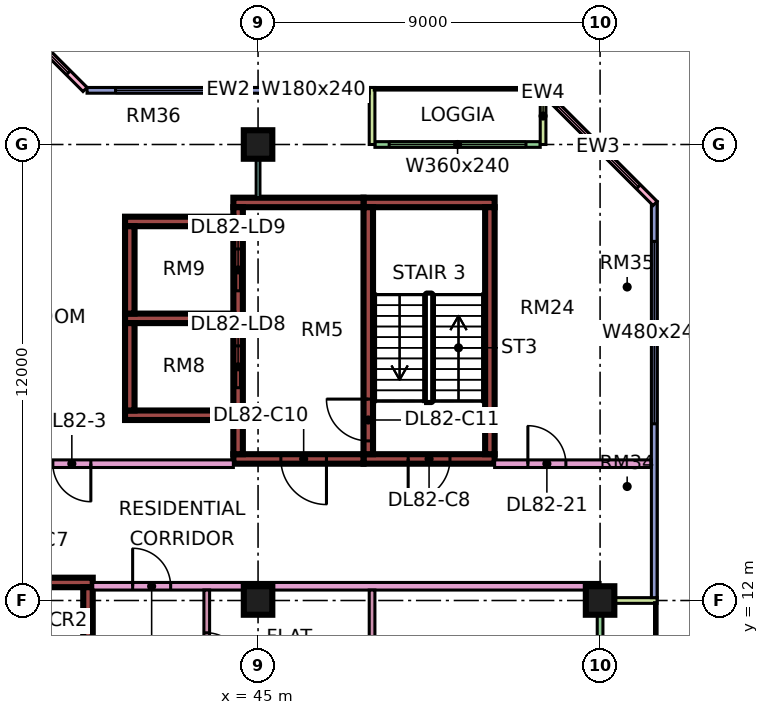
"""IFC4 building model, lengths in metres.
Left out: names, types, materials, properties, quantities, classifications, styles, units other than length and angle.
Written with IfcOpenShell. Run it as: python <this file> out.ifc"""

import sys

from ifc_helpers import new_model, si_unit, direction, frame, frame_2d, origin, origin_2d, place, context, subcontext, project, spatial, rectangle, extrude, element, fill, save


model = new_model("IFC4")
c1 = context("Model", 3, precision=1e-05, world=origin(), true_north=direction((0.0, 1.0)))
c2 = subcontext(c1, "Body", "Model", "MODEL_VIEW")
j1 = project(units=[si_unit("LENGTHUNIT", "METRE"), si_unit("PLANEANGLEUNIT", "RADIAN")], contexts=[c1])
p1 = place(None, origin())
s1 = spatial("IfcSite", under=j1, at=p1, CompositionType="ELEMENT")
p2 = place(p1, origin())
s2 = spatial("IfcBuilding", under=s1, at=p2, CompositionType="ELEMENT")
p3 = place(p2, frame((0.0, 0.0, 353.9)))
s3 = spatial("IfcBuildingStorey", under=s2, at=p3, CompositionType="ELEMENT", Elevation=353.9)
for number, where, z_axis, x_axis in (
    (1, (45.0, 12.0, 0.0), (0.0, 0.0, 1.0), (1.0, 0.0, 0.0)),
    (2, (45.0, 24.0, 0.0), (0.0, 0.0, 1.0), (1.0, 0.0, 0.0)),
    (3, (54.0, 12.0, 0.0), (0.0, 0.0, 1.0), (1.0, 0.0, 0.0)),
):
    element("IfcColumn", number, at=place(p3, frame(where, z_axis=z_axis, x_axis=x_axis)), inside=s3, PredefinedType="COLUMN", context=c2, shape_type="SweptSolid", body=[
        extrude(rectangle(XDim=0.75, YDim=0.75, at=origin_2d()), origin(), (0.0, 0.0, 1.0), 3.75),
    ])
p4 = place(p3, frame((36.375, 12.475, 0.0), z_axis=(0.0, 0.0, 1.0), x_axis=(1.0, 0.0, 0.0)))
e4 = element("IfcWall", 4, at=p4, inside=s3, PredefinedType="SHEAR", context=c2, shape_type="SweptSolid", body=[
    extrude(rectangle(XDim=4.275, YDim=0.25, at=frame_2d((2.137, 0.0))), origin(), (0.0, 0.0, 1.0), 3.75),
])
p5 = place(p4, frame((2.0, 0.0, 0.0)))
e5 = element("IfcOpeningElement", 5, at=p5, cuts=e4, PredefinedType="OPENING", context=c2, shape_type="SweptSolid", body=[
    extrude(rectangle(XDim=1.1, YDim=2.2, at=frame_2d((0.55, 1.1))), frame((0.0, 0.135, 0.0), z_axis=(0.0, -1.0, 0.0), x_axis=(1.0, 0.0, 0.0)), (0.0, 0.0, 1.0), 0.27),
])
p6 = place(p3, frame((40.525, 5.85, 0.0), z_axis=(0.0, 0.0, 1.0), x_axis=(0.0, 1.0, 0.0)))
e6 = element("IfcWall", 6, at=p6, inside=s3, PredefinedType="SHEAR", context=c2, shape_type="SweptSolid", body=[
    extrude(rectangle(XDim=6.5, YDim=0.25, at=frame_2d((3.25, 0.0))), origin(), (0.0, 0.0, 1.0), 3.75),
])
p7 = place(p3, frame((47.775, 15.725, 0.0), z_axis=(0.0, 0.0, 1.0), x_axis=(1.0, 0.0, 0.0)))
e7 = element("IfcWall", 7, at=p7, inside=s3, PredefinedType="SHEAR", context=c2, shape_type="SweptSolid", body=[
    extrude(rectangle(XDim=3.45, YDim=0.25, at=frame_2d((1.725, 0.0))), origin(), (0.0, 0.0, 1.0), 3.75),
])
p8 = place(p7, frame((1.175, 0.0, 0.0)))
e8 = element("IfcOpeningElement", 8, at=p8, cuts=e7, PredefinedType="OPENING", context=c2, shape_type="SweptSolid", body=[
    extrude(rectangle(XDim=1.1, YDim=2.2, at=frame_2d((0.55, 1.1))), frame((0.0, 0.135, 0.0), z_axis=(0.0, -1.0, 0.0), x_axis=(1.0, 0.0, 0.0)), (0.0, 0.0, 1.0), 0.27),
])
p9 = place(p3, frame((47.775, 22.475, 0.0), z_axis=(0.0, 0.0, 1.0), x_axis=(1.0, 0.0, 0.0)))
e9 = element("IfcWall", 9, at=p9, inside=s3, PredefinedType="SHEAR", context=c2, shape_type="SweptSolid", body=[
    extrude(rectangle(XDim=3.45, YDim=0.25, at=frame_2d((1.725, 0.0))), origin(), (0.0, 0.0, 1.0), 3.75),
])
p10 = place(p3, frame((47.9, 15.85, 0.0), z_axis=(0.0, 0.0, 1.0), x_axis=(0.0, 1.0, 0.0)))
e10 = element("IfcWall", 10, at=p10, inside=s3, PredefinedType="SHEAR", context=c2, shape_type="SweptSolid", body=[
    extrude(rectangle(XDim=6.5, YDim=0.25, at=frame_2d((3.25, 0.0))), origin(), (0.0, 0.0, 1.0), 3.75),
])
p11 = place(p10, frame((0.35, 0.0, 0.0)))
e11 = element("IfcOpeningElement", 11, at=p11, cuts=e10, PredefinedType="OPENING", context=c2, shape_type="SweptSolid", body=[
    extrude(rectangle(XDim=1.1, YDim=2.2, at=frame_2d((0.55, 1.1))), frame((0.0, 0.135, 0.0), z_axis=(0.0, -1.0, 0.0), x_axis=(1.0, 0.0, 0.0)), (0.0, 0.0, 1.0), 0.27),
])
p12 = place(p3, frame((51.1, 15.85, 0.0), z_axis=(0.0, 0.0, 1.0), x_axis=(0.0, 1.0, 0.0)))
e12 = element("IfcWall", 12, at=p12, inside=s3, PredefinedType="SHEAR", context=c2, shape_type="SweptSolid", body=[
    extrude(rectangle(XDim=6.5, YDim=0.25, at=frame_2d((3.25, 0.0))), origin(), (0.0, 0.0, 1.0), 3.75),
])
p13 = place(p3, frame((44.35, 15.725, 0.0), z_axis=(0.0, 0.0, 1.0), x_axis=(1.0, 0.0, 0.0)))
e13 = element("IfcWall", 13, at=p13, inside=s3, PredefinedType="SHEAR", context=c2, shape_type="SweptSolid", body=[
    extrude(rectangle(XDim=3.425, YDim=0.25, at=frame_2d((1.712, 0.0))), origin(), (0.0, 0.0, 1.0), 3.75),
])
p14 = place(p13, frame((1.25, 0.0, 0.0)))
e14 = element("IfcOpeningElement", 14, at=p14, cuts=e13, PredefinedType="OPENING", context=c2, shape_type="SweptSolid", body=[
    extrude(rectangle(XDim=1.2, YDim=2.2, at=frame_2d((0.6, 1.1))), frame((0.0, 0.135, 0.0), z_axis=(0.0, -1.0, 0.0), x_axis=(1.0, 0.0, 0.0)), (0.0, 0.0, 1.0), 0.27),
])
p15 = place(p3, frame((44.35, 22.475, 0.0), z_axis=(0.0, 0.0, 1.0), x_axis=(1.0, 0.0, 0.0)))
e15 = element("IfcWall", 15, at=p15, inside=s3, PredefinedType="SHEAR", context=c2, shape_type="SweptSolid", body=[
    extrude(rectangle(XDim=3.425, YDim=0.25, at=frame_2d((1.712, 0.0))), origin(), (0.0, 0.0, 1.0), 3.75),
])
p16 = place(p3, frame((44.475, 15.85, 0.0), z_axis=(0.0, 0.0, 1.0), x_axis=(0.0, 1.0, 0.0)))
e16 = element("IfcWall", 16, at=p16, inside=s3, PredefinedType="SHEAR", context=c2, shape_type="SweptSolid", body=[
    extrude(rectangle(XDim=6.5, YDim=0.25, at=frame_2d((3.25, 0.0))), origin(), (0.0, 0.0, 1.0), 3.75),
])
p17 = place(p16, frame((1.75, 0.0, 0.0)))
e17 = element("IfcOpeningElement", 17, at=p17, cuts=e16, PredefinedType="OPENING", context=c2, shape_type="SweptSolid", body=[
    extrude(rectangle(XDim=1.1, YDim=2.2, at=frame_2d((0.55, 1.1))), frame((0.0, 0.135, 0.0), z_axis=(0.0, -1.0, 0.0), x_axis=(1.0, 0.0, 0.0)), (0.0, 0.0, 1.0), 0.27),
])
p18 = place(p16, frame((4.3, 0.0, 0.0)))
e18 = element("IfcOpeningElement", 18, at=p18, cuts=e16, PredefinedType="OPENING", context=c2, shape_type="SweptSolid", body=[
    extrude(rectangle(XDim=1.1, YDim=2.2, at=frame_2d((0.55, 1.1))), frame((0.0, 0.135, 0.0), z_axis=(0.0, -1.0, 0.0), x_axis=(1.0, 0.0, 0.0)), (0.0, 0.0, 1.0), 0.27),
])
for number, where, z_axis, x_axis in (
    (19, (41.5, 16.875, 0.0), (0.0, 0.0, 1.0), (1.0, 0.0, 0.0)),
    (20, (41.5, 19.425, 0.0), (0.0, 0.0, 1.0), (1.0, 0.0, 0.0)),
    (21, (41.5, 21.975, 0.0), (0.0, 0.0, 1.0), (1.0, 0.0, 0.0)),
):
    element("IfcWall", number, at=place(p3, frame(where, z_axis=z_axis, x_axis=x_axis)), inside=s3, PredefinedType="SHEAR", context=c2, shape_type="SweptSolid", body=[
        extrude(rectangle(XDim=2.85, YDim=0.25, at=frame_2d((1.425, 0.0))), origin(), (0.0, 0.0, 1.0), 3.75),
    ])
for number, where, z_axis, x_axis in (
    (22, (41.625, 17.0, 0.0), (0.0, 0.0, 1.0), (0.0, 1.0, 0.0)),
    (23, (41.625, 19.55, 0.0), (0.0, 0.0, 1.0), (0.0, 1.0, 0.0)),
):
    element("IfcWall", number, at=place(p3, frame(where, z_axis=z_axis, x_axis=x_axis)), inside=s3, PredefinedType="SHEAR", context=c2, shape_type="SweptSolid", body=[
        extrude(rectangle(XDim=2.3, YDim=0.25, at=frame_2d((1.15, 0.0))), origin(), (0.0, 0.0, 1.0), 3.75),
    ])
p19 = place(p3, frame((52.425, 24.0, 0.0), z_axis=(0.0, 0.0, 1.0), x_axis=(-1.0, 0.0, 0.0)))
e24 = element("IfcWall", 24, at=p19, inside=s3, PredefinedType="SOLIDWALL", context=c2, shape_type="SweptSolid", body=[
    extrude(rectangle(XDim=4.35, YDim=0.15, at=frame_2d((2.175, 0.0))), origin(), (0.0, 0.0, 1.0), 3.35),
])
p20 = place(p19, frame((0.375, 0.0, 0.45)))
e25 = element("IfcOpeningElement", 25, at=p20, cuts=e24, PredefinedType="OPENING", context=c2, shape_type="SweptSolid", body=[
    extrude(rectangle(XDim=3.6, YDim=2.4, at=frame_2d((1.8, 1.2))), frame((0.0, 0.085, 0.0), z_axis=(0.0, -1.0, 0.0), x_axis=(1.0, 0.0, 0.0)), (0.0, 0.0, 1.0), 0.17),
])
for number, where, z_axis, x_axis in (
    (26, (52.5, 25.5, 0.0), (0.0, 0.0, 1.0), (0.0, -1.0, 0.0)),
    (27, (48.0, 25.5, 0.0), (0.0, 0.0, 1.0), (0.0, -1.0, 0.0)),
):
    element("IfcWall", number, at=place(p3, frame(where, z_axis=z_axis, x_axis=x_axis)), inside=s3, PredefinedType="SOLIDWALL", context=c2, shape_type="SweptSolid", body=[
        extrude(rectangle(XDim=1.5, YDim=0.15, at=frame_2d((0.75, 0.0))), origin(), (0.0, 0.0, 1.0), 3.35),
    ])
p21 = place(p3, frame((47.925, 25.425, 0.0), z_axis=(0.0, 0.0, 1.0), x_axis=(-1.0, 0.0, 0.0)))
e28 = element("IfcWall", 28, at=p21, inside=s3, PredefinedType="SOLIDWALL", context=c2, shape_type="SweptSolid", body=[
    extrude(rectangle(XDim=7.425, YDim=0.15, at=frame_2d((3.712, 0.0))), origin(), (0.0, 0.0, 1.0), 3.35),
])
p22 = place(p21, frame((0.562, 0.0, 0.45)))
e29 = element("IfcOpeningElement", 29, at=p22, cuts=e28, PredefinedType="OPENING", context=c2, shape_type="SweptSolid", body=[
    extrude(rectangle(XDim=1.8, YDim=2.4, at=frame_2d((0.9, 1.2))), frame((0.0, 0.085, 0.0), z_axis=(0.0, -1.0, 0.0), x_axis=(1.0, 0.0, 0.0)), (0.0, 0.0, 1.0), 0.17),
])
p23 = place(p21, frame((3.675, 0.0, 0.45)))
e30 = element("IfcOpeningElement", 30, at=p23, cuts=e28, PredefinedType="OPENING", context=c2, shape_type="SweptSolid", body=[
    extrude(rectangle(XDim=3.0, YDim=2.4, at=frame_2d((1.5, 1.2))), frame((0.0, 0.085, 0.0), z_axis=(0.0, -1.0, 0.0), x_axis=(1.0, 0.0, 0.0)), (0.0, 0.0, 1.0), 0.17),
])
p24 = place(p3, frame((40.447, 25.447, 0.0), z_axis=(0.0, 0.0, 1.0), x_axis=(-0.707106781187, 0.707106781187, 0.0)))
e31 = element("IfcWall", 31, at=p24, inside=s3, PredefinedType="SOLIDWALL", context=c2, shape_type="SweptSolid", body=[
    extrude(rectangle(XDim=4.243, YDim=0.15, at=frame_2d((2.121, 0.0))), origin(), (0.0, 0.0, 1.0), 3.35),
])
p25 = place(p24, frame((0.621, 0.0, 0.45)))
e32 = element("IfcOpeningElement", 32, at=p25, cuts=e31, PredefinedType="OPENING", context=c2, shape_type="SweptSolid", body=[
    extrude(rectangle(XDim=3.0, YDim=2.4, at=frame_2d((1.5, 1.2))), frame((0.0, 0.085, 0.0), z_axis=(0.0, -1.0, 0.0), x_axis=(1.0, 0.0, 0.0)), (0.0, 0.0, 1.0), 0.17),
])
p26 = place(p3, frame((54.0, 1.575, 0.0), z_axis=(0.0, 0.0, 1.0), x_axis=(0.0, 1.0, 0.0)))
e33 = element("IfcWall", 33, at=p26, inside=s3, PredefinedType="SOLIDWALL", context=c2, shape_type="SweptSolid", body=[
    extrude(rectangle(XDim=10.35, YDim=0.15, at=frame_2d((5.175, 0.0))), origin(), (0.0, 0.0, 1.0), 3.35),
])
p27 = place(p26, frame((0.663, 0.0, 0.0)))
e34 = element("IfcOpeningElement", 34, at=p27, cuts=e33, PredefinedType="OPENING", context=c2, shape_type="SweptSolid", body=[
    extrude(rectangle(XDim=1.8, YDim=2.4, at=frame_2d((0.9, 1.2))), frame((0.0, 0.085, 0.0), z_axis=(0.0, -1.0, 0.0), x_axis=(1.0, 0.0, 0.0)), (0.0, 0.0, 1.0), 0.17),
])
p28 = place(p26, frame((5.637, 0.0, 0.45)))
e35 = element("IfcOpeningElement", 35, at=p28, cuts=e33, PredefinedType="OPENING", context=c2, shape_type="SweptSolid", body=[
    extrude(rectangle(XDim=3.0, YDim=2.4, at=frame_2d((1.5, 1.2))), frame((0.0, 0.085, 0.0), z_axis=(0.0, -1.0, 0.0), x_axis=(1.0, 0.0, 0.0)), (0.0, 0.0, 1.0), 0.17),
])
p29 = place(p3, frame((55.5, 12.0, 0.0), z_axis=(0.0, 0.0, 1.0), x_axis=(-1.0, 0.0, 0.0)))
e36 = element("IfcWall", 36, at=p29, inside=s3, PredefinedType="SOLIDWALL", context=c2, shape_type="SweptSolid", body=[
    extrude(rectangle(XDim=1.5, YDim=0.15, at=frame_2d((0.75, 0.0))), origin(), (0.0, 0.0, 1.0), 3.35),
])
p30 = place(p3, frame((55.425, 12.075, 0.0), z_axis=(0.0, 0.0, 1.0), x_axis=(0.0, 1.0, 0.0)))
e37 = element("IfcWall", 37, at=p30, inside=s3, PredefinedType="SOLIDWALL", context=c2, shape_type="SweptSolid", body=[
    extrude(rectangle(XDim=10.425, YDim=0.15, at=frame_2d((5.212, 0.0))), origin(), (0.0, 0.0, 1.0), 3.35),
])
p31 = place(p30, frame((4.575, 0.0, 0.45)))
e38 = element("IfcOpeningElement", 38, at=p31, cuts=e37, PredefinedType="OPENING", context=c2, shape_type="SweptSolid", body=[
    extrude(rectangle(XDim=4.8, YDim=2.4, at=frame_2d((2.4, 1.2))), frame((0.0, 0.085, 0.0), z_axis=(0.0, -1.0, 0.0), x_axis=(1.0, 0.0, 0.0)), (0.0, 0.0, 1.0), 0.17),
])
p32 = place(p3, frame((55.447, 22.447, 0.0), z_axis=(0.0, 0.0, 1.0), x_axis=(-0.707106781187, 0.707106781187, 0.0)))
e39 = element("IfcWall", 39, at=p32, inside=s3, PredefinedType="SOLIDWALL", context=c2, shape_type="SweptSolid", body=[
    extrude(rectangle(XDim=4.243, YDim=0.15, at=frame_2d((2.121, 0.0))), origin(), (0.0, 0.0, 1.0), 3.35),
])
p33 = place(p32, frame((0.621, 0.0, 0.45)))
e40 = element("IfcOpeningElement", 40, at=p33, cuts=e39, PredefinedType="OPENING", context=c2, shape_type="SweptSolid", body=[
    extrude(rectangle(XDim=3.0, YDim=2.4, at=frame_2d((1.5, 1.2))), frame((0.0, 0.085, 0.0), z_axis=(0.0, -1.0, 0.0), x_axis=(1.0, 0.0, 0.0)), (0.0, 0.0, 1.0), 0.17),
])
p34 = place(p3, frame((34.0, 15.6, 0.0), z_axis=(0.0, 0.0, 1.0), x_axis=(1.0, 0.0, 0.0)))
e41 = element("IfcWall", 41, at=p34, inside=s3, PredefinedType="PARTITIONING", context=c2, shape_type="SweptSolid", body=[
    extrude(rectangle(XDim=10.35, YDim=0.2, at=frame_2d((5.175, 0.0))), origin(), (0.0, 0.0, 1.0), 3.35),
])
p35 = place(p34, frame((5.6, 0.0, 0.0)))
e42 = element("IfcOpeningElement", 42, at=p35, cuts=e41, PredefinedType="OPENING", context=c2, shape_type="SweptSolid", body=[
    extrude(rectangle(XDim=1.0, YDim=2.1, at=frame_2d((0.5, 1.05))), frame((0.0, 0.11, 0.0), z_axis=(0.0, -1.0, 0.0), x_axis=(1.0, 0.0, 0.0)), (0.0, 0.0, 1.0), 0.22),
])
p36 = place(p34, frame((0.45, 0.0, 0.0)))
e43 = element("IfcOpeningElement", 43, at=p36, cuts=e41, PredefinedType="OPENING", context=c2, shape_type="SweptSolid", body=[
    extrude(rectangle(XDim=1.2, YDim=2.1, at=frame_2d((0.6, 1.05))), frame((0.0, 0.11, 0.0), z_axis=(0.0, -1.0, 0.0), x_axis=(1.0, 0.0, 0.0)), (0.0, 0.0, 1.0), 0.22),
])
p37 = place(p3, frame((40.65, 12.375, 0.0), z_axis=(0.0, 0.0, 1.0), x_axis=(1.0, 0.0, 0.0)))
e44 = element("IfcWall", 44, at=p37, inside=s3, PredefinedType="PARTITIONING", context=c2, shape_type="SweptSolid", body=[
    extrude(rectangle(XDim=13.35, YDim=0.2, at=frame_2d((6.675, 0.0))), origin(), (0.0, 0.0, 1.0), 3.35),
])
p38 = place(p37, frame((1.05, 0.0, 0.0)))
e45 = element("IfcOpeningElement", 45, at=p38, cuts=e44, PredefinedType="OPENING", context=c2, shape_type="SweptSolid", body=[
    extrude(rectangle(XDim=1.0, YDim=2.1, at=frame_2d((0.5, 1.05))), frame((0.0, 0.11, 0.0), z_axis=(0.0, -1.0, 0.0), x_axis=(1.0, 0.0, 0.0)), (0.0, 0.0, 1.0), 0.22),
])
p39 = place(p3, frame((43.65, 5.975, 0.0), z_axis=(0.0, 0.0, 1.0), x_axis=(0.0, 1.0, 0.0)))
e46 = element("IfcWall", 46, at=p39, inside=s3, PredefinedType="PARTITIONING", context=c2, shape_type="SweptSolid", body=[
    extrude(rectangle(XDim=6.3, YDim=0.15, at=frame_2d((3.15, 0.0))), origin(), (0.0, 0.0, 1.0), 3.35),
])
p40 = place(p39, frame((4.275, 0.0, 0.0)))
e47 = element("IfcOpeningElement", 47, at=p40, cuts=e46, PredefinedType="OPENING", context=c2, shape_type="SweptSolid", body=[
    extrude(rectangle(XDim=0.9, YDim=2.1, at=frame_2d((0.45, 1.05))), frame((0.0, 0.085, 0.0), z_axis=(0.0, -1.0, 0.0), x_axis=(1.0, 0.0, 0.0)), (0.0, 0.0, 1.0), 0.17),
])
p41 = place(p3, frame((45.0, 22.6, 0.0), z_axis=(0.0, 0.0, 1.0), x_axis=(0.0, 1.0, 0.0)))
e48 = element("IfcWall", 48, at=p41, inside=s3, PredefinedType="PARTITIONING", context=c2, shape_type="SweptSolid", body=[
    extrude(rectangle(XDim=1.4, YDim=0.1, at=frame_2d((0.7, 0.0))), origin(), (0.0, 0.0, 1.0), 3.35),
])
p42 = place(p3, frame((48.0, 5.975, 0.0), z_axis=(0.0, 0.0, 1.0), x_axis=(0.0, 1.0, 0.0)))
e49 = element("IfcWall", 49, at=p42, inside=s3, PredefinedType="PARTITIONING", context=c2, shape_type="SweptSolid", body=[
    extrude(rectangle(XDim=6.3, YDim=0.15, at=frame_2d((3.15, 0.0))), origin(), (0.0, 0.0, 1.0), 3.35),
])
p43 = place(p3, frame((51.225, 15.6, 0.0), z_axis=(0.0, 0.0, 1.0), x_axis=(1.0, 0.0, 0.0)))
e50 = element("IfcWall", 50, at=p43, inside=s3, PredefinedType="PARTITIONING", context=c2, shape_type="SweptSolid", body=[
    extrude(rectangle(XDim=4.125, YDim=0.2, at=frame_2d((2.062, 0.0))), origin(), (0.0, 0.0, 1.0), 3.35),
])
p44 = place(p43, frame((0.875, 0.0, 0.0)))
e51 = element("IfcOpeningElement", 51, at=p44, cuts=e50, PredefinedType="OPENING", context=c2, shape_type="SweptSolid", body=[
    extrude(rectangle(XDim=1.0, YDim=2.1, at=frame_2d((0.5, 1.05))), frame((0.0, 0.11, 0.0), z_axis=(0.0, -1.0, 0.0), x_axis=(1.0, 0.0, 0.0)), (0.0, 0.0, 1.0), 0.22),
])
p45 = place(p20, origin())
e52 = element("IfcWindow", 52, at=p45, inside=s3, PartitioningType="SINGLE_PANEL", PredefinedType="WINDOW", context=c2, shape_type="SweptSolid", body=[
    extrude(rectangle(XDim=3.6, YDim=2.4, at=frame_2d((1.8, 1.2))), frame((0.0, 0.03, 0.0), z_axis=(0.0, -1.0, 0.0), x_axis=(1.0, 0.0, 0.0)), (0.0, 0.0, 1.0), 0.06),
])
fill(e25, e52)
p46 = place(p22, origin())
e53 = element("IfcWindow", 53, at=p46, inside=s3, PartitioningType="SINGLE_PANEL", PredefinedType="WINDOW", context=c2, shape_type="SweptSolid", body=[
    extrude(rectangle(XDim=1.8, YDim=2.4, at=frame_2d((0.9, 1.2))), frame((0.0, 0.03, 0.0), z_axis=(0.0, -1.0, 0.0), x_axis=(1.0, 0.0, 0.0)), (0.0, 0.0, 1.0), 0.06),
])
fill(e29, e53)
p47 = place(p23, origin())
e54 = element("IfcWindow", 54, at=p47, inside=s3, PartitioningType="SINGLE_PANEL", PredefinedType="WINDOW", context=c2, shape_type="SweptSolid", body=[
    extrude(rectangle(XDim=3.0, YDim=2.4, at=frame_2d((1.5, 1.2))), frame((0.0, 0.03, 0.0), z_axis=(0.0, -1.0, 0.0), x_axis=(1.0, 0.0, 0.0)), (0.0, 0.0, 1.0), 0.06),
])
fill(e30, e54)
p48 = place(p25, origin())
e55 = element("IfcWindow", 55, at=p48, inside=s3, PartitioningType="SINGLE_PANEL", PredefinedType="WINDOW", context=c2, shape_type="SweptSolid", body=[
    extrude(rectangle(XDim=3.0, YDim=2.4, at=frame_2d((1.5, 1.2))), frame((0.0, 0.03, 0.0), z_axis=(0.0, -1.0, 0.0), x_axis=(1.0, 0.0, 0.0)), (0.0, 0.0, 1.0), 0.06),
])
fill(e32, e55)
p49 = place(p31, origin())
e56 = element("IfcWindow", 56, at=p49, inside=s3, PartitioningType="SINGLE_PANEL", PredefinedType="WINDOW", context=c2, shape_type="SweptSolid", body=[
    extrude(rectangle(XDim=4.8, YDim=2.4, at=frame_2d((2.4, 1.2))), frame((0.0, 0.03, 0.0), z_axis=(0.0, -1.0, 0.0), x_axis=(1.0, 0.0, 0.0)), (0.0, 0.0, 1.0), 0.06),
])
fill(e38, e56)
p50 = place(p33, origin())
e57 = element("IfcWindow", 57, at=p50, inside=s3, PartitioningType="SINGLE_PANEL", PredefinedType="WINDOW", context=c2, shape_type="SweptSolid", body=[
    extrude(rectangle(XDim=3.0, YDim=2.4, at=frame_2d((1.5, 1.2))), frame((0.0, 0.03, 0.0), z_axis=(0.0, -1.0, 0.0), x_axis=(1.0, 0.0, 0.0)), (0.0, 0.0, 1.0), 0.06),
])
fill(e40, e57)
p51 = place(p8, frame((1.1, 0.0, 0.0), z_axis=(0.0, 0.0, 1.0), x_axis=(-1.0, 0.0, 0.0)))
e58 = element("IfcDoor", 58, at=p51, inside=s3, OperationType="SINGLE_SWING_LEFT", PredefinedType="DOOR", context=c2, shape_type="SweptSolid", body=[
    extrude(rectangle(XDim=1.1, YDim=2.2, at=frame_2d((0.55, 1.1))), frame((0.0, 0.025, 0.0), z_axis=(0.0, -1.0, 0.0), x_axis=(1.0, 0.0, 0.0)), (0.0, 0.0, 1.0), 0.05),
])
fill(e8, e58)
p52 = place(p14, origin())
e59 = element("IfcDoor", 59, at=p52, inside=s3, OperationType="SINGLE_SWING_RIGHT", PredefinedType="DOOR", context=c2, shape_type="SweptSolid", body=[
    extrude(rectangle(XDim=1.2, YDim=2.2, at=frame_2d((0.6, 1.1))), frame((0.0, 0.025, 0.0), z_axis=(0.0, -1.0, 0.0), x_axis=(1.0, 0.0, 0.0)), (0.0, 0.0, 1.0), 0.05),
])
fill(e14, e59)
p53 = place(p11, frame((1.1, 0.0, 0.0), z_axis=(0.0, 0.0, 1.0), x_axis=(-1.0, 0.0, 0.0)))
e60 = element("IfcDoor", 60, at=p53, inside=s3, OperationType="SINGLE_SWING_RIGHT", PredefinedType="DOOR", context=c2, shape_type="SweptSolid", body=[
    extrude(rectangle(XDim=1.1, YDim=2.2, at=frame_2d((0.55, 1.1))), frame((0.0, 0.025, 0.0), z_axis=(0.0, -1.0, 0.0), x_axis=(1.0, 0.0, 0.0)), (0.0, 0.0, 1.0), 0.05),
])
fill(e11, e60)
p54 = place(p17, origin())
e61 = element("IfcDoor", 61, at=p54, inside=s3, OperationType="DOUBLE_DOOR_SLIDING", PredefinedType="DOOR", context=c2, shape_type="SweptSolid", body=[
    extrude(rectangle(XDim=1.1, YDim=2.2, at=frame_2d((0.55, 1.1))), frame((0.0, 0.025, 0.0), z_axis=(0.0, -1.0, 0.0), x_axis=(1.0, 0.0, 0.0)), (0.0, 0.0, 1.0), 0.05),
])
fill(e17, e61)
p55 = place(p18, origin())
e62 = element("IfcDoor", 62, at=p55, inside=s3, OperationType="DOUBLE_DOOR_SLIDING", PredefinedType="DOOR", context=c2, shape_type="SweptSolid", body=[
    extrude(rectangle(XDim=1.1, YDim=2.2, at=frame_2d((0.55, 1.1))), frame((0.0, 0.025, 0.0), z_axis=(0.0, -1.0, 0.0), x_axis=(1.0, 0.0, 0.0)), (0.0, 0.0, 1.0), 0.05),
])
fill(e18, e62)
p56 = place(p35, origin())
e63 = element("IfcDoor", 63, at=p56, inside=s3, OperationType="SINGLE_SWING_RIGHT", PredefinedType="DOOR", context=c2, shape_type="SweptSolid", body=[
    extrude(rectangle(XDim=1.0, YDim=2.1, at=frame_2d((0.5, 1.05))), frame((0.0, 0.025, 0.0), z_axis=(0.0, -1.0, 0.0), x_axis=(1.0, 0.0, 0.0)), (0.0, 0.0, 1.0), 0.05),
])
fill(e42, e63)
p57 = place(p44, origin())
e64 = element("IfcDoor", 64, at=p57, inside=s3, OperationType="SINGLE_SWING_LEFT", PredefinedType="DOOR", context=c2, shape_type="SweptSolid", body=[
    extrude(rectangle(XDim=1.0, YDim=2.1, at=frame_2d((0.5, 1.05))), frame((0.0, 0.025, 0.0), z_axis=(0.0, -1.0, 0.0), x_axis=(1.0, 0.0, 0.0)), (0.0, 0.0, 1.0), 0.05),
])
fill(e51, e64)
p58 = place(p38, origin())
e65 = element("IfcDoor", 65, at=p58, inside=s3, OperationType="SINGLE_SWING_LEFT", PredefinedType="DOOR", context=c2, shape_type="SweptSolid", body=[
    extrude(rectangle(XDim=1.0, YDim=2.1, at=frame_2d((0.5, 1.05))), frame((0.0, 0.025, 0.0), z_axis=(0.0, -1.0, 0.0), x_axis=(1.0, 0.0, 0.0)), (0.0, 0.0, 1.0), 0.05),
])
fill(e45, e65)
p59 = place(p40, frame((0.9, 0.0, 0.0), z_axis=(0.0, 0.0, 1.0), x_axis=(-1.0, 0.0, 0.0)))
e66 = element("IfcDoor", 66, at=p59, inside=s3, OperationType="SINGLE_SWING_LEFT", PredefinedType="DOOR", context=c2, shape_type="SweptSolid", body=[
    extrude(rectangle(XDim=0.9, YDim=2.1, at=frame_2d((0.45, 1.05))), frame((0.0, 0.025, 0.0), z_axis=(0.0, -1.0, 0.0), x_axis=(1.0, 0.0, 0.0)), (0.0, 0.0, 1.0), 0.05),
])
fill(e47, e66)
save(model, sys.argv[1])
